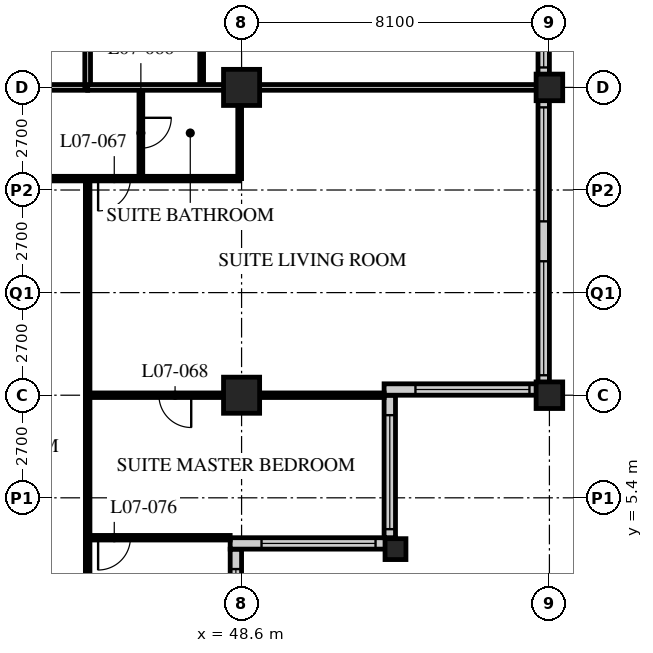
"""IFC4 building model, lengths in metres.
Left out: names, types, materials, properties, quantities, classifications, styles, units other than length and angle.
Written with IfcOpenShell. Run it as: python <this file> out.ifc"""

import sys

from ifc_helpers import new_model, si_unit, direction, frame, frame_2d, origin, origin_2d, place, context, subcontext, project, spatial, rectangle, hollow_rectangle, extrude, element, fill, save


model = new_model("IFC4")
c1 = context("Model", 3, precision=1e-05, world=origin(), true_north=direction((0.0, 1.0)))
c2 = subcontext(c1, "Body", "Model", "MODEL_VIEW")
j1 = project(units=[si_unit("LENGTHUNIT", "METRE"), si_unit("PLANEANGLEUNIT", "RADIAN")], contexts=[c1])
p1 = place(None, origin())
s1 = spatial("IfcSite", under=j1, at=p1, CompositionType="ELEMENT")
p2 = place(p1, origin())
s2 = spatial("IfcBuilding", under=s1, at=p2, CompositionType="ELEMENT")
p3 = place(p2, frame((0.0, 0.0, 36.4)))
s3 = spatial("IfcBuildingStorey", under=s2, at=p3, CompositionType="ELEMENT", Elevation=36.4)
for number, where, z_axis, x_axis in (
    (1, (48.6, 8.1, 0.0), (0.0, 0.0, 1.0), (1.0, 0.0, 0.0)),
    (2, (48.6, 16.2, 0.0), (0.0, 0.0, 1.0), (1.0, 0.0, 0.0)),
):
    element("IfcColumn", number, at=place(p3, frame(where, z_axis=z_axis, x_axis=x_axis)), inside=s3, PredefinedType="COLUMN", context=c2, shape_type="SweptSolid", body=[
        extrude(hollow_rectangle(XDim=0.95, YDim=0.95, WallThickness=0.095, at=origin_2d()), origin(), (0.0, 0.0, 1.0), 3.4),
    ])
p4 = place(p3, frame((52.65, 4.05, 0.0), z_axis=(0.0, 0.0, 1.0), x_axis=(1.0, 0.0, 0.0)))
e3 = element("IfcColumn", 3, at=p4, inside=s3, PredefinedType="COLUMN", context=c2, shape_type="SweptSolid", body=[
    extrude(hollow_rectangle(XDim=0.55, YDim=0.55, WallThickness=0.05, at=origin_2d()), origin(), (0.0, 0.0, 1.0), 3.4),
])
for number, where, z_axis, x_axis in (
    (4, (56.7, 8.1, 0.0), (0.0, 0.0, 1.0), (1.0, 0.0, 0.0)),
    (5, (56.7, 16.2, 0.0), (0.0, 0.0, 1.0), (1.0, 0.0, 0.0)),
):
    element("IfcColumn", number, at=place(p3, frame(where, z_axis=z_axis, x_axis=x_axis)), inside=s3, PredefinedType="COLUMN", context=c2, shape_type="SweptSolid", body=[
        extrude(hollow_rectangle(XDim=0.7, YDim=0.7, WallThickness=0.06, at=origin_2d()), origin(), (0.0, 0.0, 1.0), 3.4),
    ])
p5 = place(p3, frame((48.45, 0.3, 0.0), z_axis=(0.0, 0.0, 1.0), x_axis=(0.0, 1.0, 0.0)))
e6 = element("IfcWall", 6, at=p5, inside=s3, PredefinedType="SOLIDWALL", context=c2, shape_type="SweptSolid", body=[
    extrude(rectangle(XDim=3.75, YDim=0.3, at=frame_2d((1.875, 0.0))), origin(), (0.0, 0.0, 1.0), 3.19),
])
p6 = place(p5, frame((0.225, 0.0, 0.9)))
e7 = element("IfcOpeningElement", 7, at=p6, cuts=e6, PredefinedType="OPENING", context=c2, shape_type="SweptSolid", body=[
    extrude(rectangle(XDim=3.0, YDim=1.5, at=frame_2d((1.5, 0.75))), frame((0.0, 0.16, 0.0), z_axis=(0.0, -1.0, 0.0), x_axis=(1.0, 0.0, 0.0)), (0.0, 0.0, 1.0), 0.32),
])
p7 = place(p3, frame((48.3, 4.2, 0.0), z_axis=(0.0, 0.0, 1.0), x_axis=(1.0, 0.0, 0.0)))
e8 = element("IfcWall", 8, at=p7, inside=s3, PredefinedType="SOLIDWALL", context=c2, shape_type="SweptSolid", body=[
    extrude(rectangle(XDim=4.35, YDim=0.3, at=frame_2d((2.175, 0.0))), origin(), (0.0, 0.0, 1.0), 3.19),
])
p8 = place(p7, frame((0.825, 0.0, 0.9)))
e9 = element("IfcOpeningElement", 9, at=p8, cuts=e8, PredefinedType="OPENING", context=c2, shape_type="SweptSolid", body=[
    extrude(rectangle(XDim=3.0, YDim=1.5, at=frame_2d((1.5, 0.75))), frame((0.0, 0.16, 0.0), z_axis=(0.0, -1.0, 0.0), x_axis=(1.0, 0.0, 0.0)), (0.0, 0.0, 1.0), 0.32),
])
p9 = place(p3, frame((52.5, 4.35, 0.0), z_axis=(0.0, 0.0, 1.0), x_axis=(0.0, 1.0, 0.0)))
e10 = element("IfcWall", 10, at=p9, inside=s3, PredefinedType="SOLIDWALL", context=c2, shape_type="SweptSolid", body=[
    extrude(rectangle(XDim=3.75, YDim=0.3, at=frame_2d((1.875, 0.0))), origin(), (0.0, 0.0, 1.0), 3.19),
])
p10 = place(p9, frame((0.225, 0.0, 0.9)))
e11 = element("IfcOpeningElement", 11, at=p10, cuts=e10, PredefinedType="OPENING", context=c2, shape_type="SweptSolid", body=[
    extrude(rectangle(XDim=3.0, YDim=1.5, at=frame_2d((1.5, 0.75))), frame((0.0, 0.16, 0.0), z_axis=(0.0, -1.0, 0.0), x_axis=(1.0, 0.0, 0.0)), (0.0, 0.0, 1.0), 0.32),
])
p11 = place(p3, frame((52.35, 8.25, 0.0), z_axis=(0.0, 0.0, 1.0), x_axis=(1.0, 0.0, 0.0)))
e12 = element("IfcWall", 12, at=p11, inside=s3, PredefinedType="SOLIDWALL", context=c2, shape_type="SweptSolid", body=[
    extrude(rectangle(XDim=4.35, YDim=0.3, at=frame_2d((2.175, 0.0))), origin(), (0.0, 0.0, 1.0), 3.19),
])
p12 = place(p11, frame((0.825, 0.0, 0.9)))
e13 = element("IfcOpeningElement", 13, at=p12, cuts=e12, PredefinedType="OPENING", context=c2, shape_type="SweptSolid", body=[
    extrude(rectangle(XDim=3.0, YDim=1.5, at=frame_2d((1.5, 0.75))), frame((0.0, 0.16, 0.0), z_axis=(0.0, -1.0, 0.0), x_axis=(1.0, 0.0, 0.0)), (0.0, 0.0, 1.0), 0.32),
])
p13 = place(p3, frame((56.55, 8.4, 0.0), z_axis=(0.0, 0.0, 1.0), x_axis=(0.0, 1.0, 0.0)))
e14 = element("IfcWall", 14, at=p13, inside=s3, PredefinedType="SOLIDWALL", context=c2, shape_type="SweptSolid", body=[
    extrude(rectangle(XDim=32.1, YDim=0.3, at=frame_2d((16.05, 0.0))), origin(), (0.0, 0.0, 1.0), 3.19),
])
p14 = place(p13, frame((0.225, 0.0, 0.9)))
e15 = element("IfcOpeningElement", 15, at=p14, cuts=e14, PredefinedType="OPENING", context=c2, shape_type="SweptSolid", body=[
    extrude(rectangle(XDim=3.0, YDim=2.0, at=frame_2d((1.5, 1.0))), frame((0.0, 0.16, 0.0), z_axis=(0.0, -1.0, 0.0), x_axis=(1.0, 0.0, 0.0)), (0.0, 0.0, 1.0), 0.32),
])
p15 = place(p13, frame((4.275, 0.0, 0.9)))
e16 = element("IfcOpeningElement", 16, at=p15, cuts=e14, PredefinedType="OPENING", context=c2, shape_type="SweptSolid", body=[
    extrude(rectangle(XDim=3.0, YDim=2.0, at=frame_2d((1.5, 1.0))), frame((0.0, 0.16, 0.0), z_axis=(0.0, -1.0, 0.0), x_axis=(1.0, 0.0, 0.0)), (0.0, 0.0, 1.0), 0.32),
])
p16 = place(p13, frame((8.325, 0.0, 0.9)))
e17 = element("IfcOpeningElement", 17, at=p16, cuts=e14, PredefinedType="OPENING", context=c2, shape_type="SweptSolid", body=[
    extrude(rectangle(XDim=3.0, YDim=2.0, at=frame_2d((1.5, 1.0))), frame((0.0, 0.16, 0.0), z_axis=(0.0, -1.0, 0.0), x_axis=(1.0, 0.0, 0.0)), (0.0, 0.0, 1.0), 0.32),
])
p17 = place(p13, frame((12.375, 0.0, 0.9)))
e18 = element("IfcOpeningElement", 18, at=p17, cuts=e14, PredefinedType="OPENING", context=c2, shape_type="SweptSolid", body=[
    extrude(rectangle(XDim=3.0, YDim=2.0, at=frame_2d((1.5, 1.0))), frame((0.0, 0.16, 0.0), z_axis=(0.0, -1.0, 0.0), x_axis=(1.0, 0.0, 0.0)), (0.0, 0.0, 1.0), 0.32),
])
p18 = place(p13, frame((16.425, 0.0, 0.9)))
e19 = element("IfcOpeningElement", 19, at=p18, cuts=e14, PredefinedType="OPENING", context=c2, shape_type="SweptSolid", body=[
    extrude(rectangle(XDim=3.0, YDim=2.0, at=frame_2d((1.5, 1.0))), frame((0.0, 0.16, 0.0), z_axis=(0.0, -1.0, 0.0), x_axis=(1.0, 0.0, 0.0)), (0.0, 0.0, 1.0), 0.32),
])
p19 = place(p13, frame((20.475, 0.0, 0.9)))
e20 = element("IfcOpeningElement", 20, at=p19, cuts=e14, PredefinedType="OPENING", context=c2, shape_type="SweptSolid", body=[
    extrude(rectangle(XDim=3.0, YDim=2.0, at=frame_2d((1.5, 1.0))), frame((0.0, 0.16, 0.0), z_axis=(0.0, -1.0, 0.0), x_axis=(1.0, 0.0, 0.0)), (0.0, 0.0, 1.0), 0.32),
])
p20 = place(p13, frame((24.525, 0.0, 0.9)))
e21 = element("IfcOpeningElement", 21, at=p20, cuts=e14, PredefinedType="OPENING", context=c2, shape_type="SweptSolid", body=[
    extrude(rectangle(XDim=3.0, YDim=2.0, at=frame_2d((1.5, 1.0))), frame((0.0, 0.16, 0.0), z_axis=(0.0, -1.0, 0.0), x_axis=(1.0, 0.0, 0.0)), (0.0, 0.0, 1.0), 0.32),
])
p21 = place(p13, frame((28.575, 0.0, 0.9)))
e22 = element("IfcOpeningElement", 22, at=p21, cuts=e14, PredefinedType="OPENING", context=c2, shape_type="SweptSolid", body=[
    extrude(rectangle(XDim=3.0, YDim=2.0, at=frame_2d((1.5, 1.0))), frame((0.0, 0.16, 0.0), z_axis=(0.0, -1.0, 0.0), x_axis=(1.0, 0.0, 0.0)), (0.0, 0.0, 1.0), 0.32),
])
p22 = place(p3, frame((12.15, 16.2, 0.0), z_axis=(0.0, 0.0, 1.0), x_axis=(1.0, 0.0, 0.0)))
e23 = element("IfcWall", 23, at=p22, inside=s3, PredefinedType="PARTITIONING", context=c2, shape_type="SweptSolid", body=[
    extrude(rectangle(XDim=32.4, YDim=0.15, at=frame_2d((16.2, 0.0))), origin(), (0.0, 0.0, 1.0), 2.578),
])
p23 = place(p22, frame((6.5, 0.0, 0.0)))
e24 = element("IfcOpeningElement", 24, at=p23, cuts=e23, PredefinedType="OPENING", context=c2, shape_type="SweptSolid", body=[
    extrude(rectangle(XDim=1.0, YDim=2.1, at=frame_2d((0.5, 1.05))), frame((0.0, 0.085, 0.0), z_axis=(0.0, -1.0, 0.0), x_axis=(1.0, 0.0, 0.0)), (0.0, 0.0, 1.0), 0.17),
])
p24 = place(p22, frame((8.4, 0.0, 0.0)))
e25 = element("IfcOpeningElement", 25, at=p24, cuts=e23, PredefinedType="OPENING", context=c2, shape_type="SweptSolid", body=[
    extrude(rectangle(XDim=1.0, YDim=2.1, at=frame_2d((0.5, 1.05))), frame((0.0, 0.085, 0.0), z_axis=(0.0, -1.0, 0.0), x_axis=(1.0, 0.0, 0.0)), (0.0, 0.0, 1.0), 0.17),
])
p25 = place(p22, frame((14.6, 0.0, 0.0)))
e26 = element("IfcOpeningElement", 26, at=p25, cuts=e23, PredefinedType="OPENING", context=c2, shape_type="SweptSolid", body=[
    extrude(rectangle(XDim=1.0, YDim=2.1, at=frame_2d((0.5, 1.05))), frame((0.0, 0.085, 0.0), z_axis=(0.0, -1.0, 0.0), x_axis=(1.0, 0.0, 0.0)), (0.0, 0.0, 1.0), 0.17),
])
p26 = place(p22, frame((16.5, 0.0, 0.0)))
e27 = element("IfcOpeningElement", 27, at=p26, cuts=e23, PredefinedType="OPENING", context=c2, shape_type="SweptSolid", body=[
    extrude(rectangle(XDim=1.0, YDim=2.1, at=frame_2d((0.5, 1.05))), frame((0.0, 0.085, 0.0), z_axis=(0.0, -1.0, 0.0), x_axis=(1.0, 0.0, 0.0)), (0.0, 0.0, 1.0), 0.17),
])
p27 = place(p22, frame((23.0, 0.0, 0.0)))
e28 = element("IfcOpeningElement", 28, at=p27, cuts=e23, PredefinedType="OPENING", context=c2, shape_type="SweptSolid", body=[
    extrude(rectangle(XDim=1.0, YDim=2.1, at=frame_2d((0.5, 1.05))), frame((0.0, 0.085, 0.0), z_axis=(0.0, -1.0, 0.0), x_axis=(1.0, 0.0, 0.0)), (0.0, 0.0, 1.0), 0.17),
])
p28 = place(p22, frame((24.6, 0.0, 0.0)))
e29 = element("IfcOpeningElement", 29, at=p28, cuts=e23, PredefinedType="OPENING", context=c2, shape_type="SweptSolid", body=[
    extrude(rectangle(XDim=1.0, YDim=2.1, at=frame_2d((0.5, 1.05))), frame((0.0, 0.085, 0.0), z_axis=(0.0, -1.0, 0.0), x_axis=(1.0, 0.0, 0.0)), (0.0, 0.0, 1.0), 0.17),
])
p29 = place(p22, frame((1.525, 0.0, 0.0)))
e30 = element("IfcOpeningElement", 30, at=p29, cuts=e23, PredefinedType="OPENING", context=c2, shape_type="SweptSolid", body=[
    extrude(rectangle(XDim=1.0, YDim=2.1, at=frame_2d((0.5, 1.05))), frame((0.0, 0.085, 0.0), z_axis=(0.0, -1.0, 0.0), x_axis=(1.0, 0.0, 0.0)), (0.0, 0.0, 1.0), 0.17),
])
p30 = place(p22, frame((29.875, 0.0, 0.0)))
e31 = element("IfcOpeningElement", 31, at=p30, cuts=e23, PredefinedType="OPENING", context=c2, shape_type="SweptSolid", body=[
    extrude(rectangle(XDim=1.0, YDim=2.1, at=frame_2d((0.5, 1.05))), frame((0.0, 0.085, 0.0), z_axis=(0.0, -1.0, 0.0), x_axis=(1.0, 0.0, 0.0)), (0.0, 0.0, 1.0), 0.17),
])
p31 = place(p3, frame((44.55, 16.2, 0.0), z_axis=(0.0, 0.0, 1.0), x_axis=(0.0, 1.0, 0.0)))
e32 = element("IfcWall", 32, at=p31, inside=s3, PredefinedType="PARTITIONING", context=c2, shape_type="SweptSolid", body=[
    extrude(rectangle(XDim=26.1, YDim=0.15, at=frame_2d((13.05, 0.0))), origin(), (0.0, 0.0, 1.0), 3.19),
])
p32 = place(p31, frame((2.75, 0.0, 0.0)))
e33 = element("IfcOpeningElement", 33, at=p32, cuts=e32, PredefinedType="OPENING", context=c2, shape_type="SweptSolid", body=[
    extrude(rectangle(XDim=1.0, YDim=2.1, at=frame_2d((0.5, 1.05))), frame((0.0, 0.085, 0.0), z_axis=(0.0, -1.0, 0.0), x_axis=(1.0, 0.0, 0.0)), (0.0, 0.0, 1.0), 0.17),
])
p33 = place(p31, frame((4.35, 0.0, 0.0)))
e34 = element("IfcOpeningElement", 34, at=p33, cuts=e32, PredefinedType="OPENING", context=c2, shape_type="SweptSolid", body=[
    extrude(rectangle(XDim=1.0, YDim=2.1, at=frame_2d((0.5, 1.05))), frame((0.0, 0.085, 0.0), z_axis=(0.0, -1.0, 0.0), x_axis=(1.0, 0.0, 0.0)), (0.0, 0.0, 1.0), 0.17),
])
p34 = place(p31, frame((8.4, 0.0, 0.0)))
e35 = element("IfcOpeningElement", 35, at=p34, cuts=e32, PredefinedType="OPENING", context=c2, shape_type="SweptSolid", body=[
    extrude(rectangle(XDim=1.0, YDim=2.1, at=frame_2d((0.5, 1.05))), frame((0.0, 0.085, 0.0), z_axis=(0.0, -1.0, 0.0), x_axis=(1.0, 0.0, 0.0)), (0.0, 0.0, 1.0), 0.17),
])
p35 = place(p31, frame((14.6, 0.0, 0.0)))
e36 = element("IfcOpeningElement", 36, at=p35, cuts=e32, PredefinedType="OPENING", context=c2, shape_type="SweptSolid", body=[
    extrude(rectangle(XDim=1.0, YDim=2.1, at=frame_2d((0.5, 1.05))), frame((0.0, 0.085, 0.0), z_axis=(0.0, -1.0, 0.0), x_axis=(1.0, 0.0, 0.0)), (0.0, 0.0, 1.0), 0.17),
])
p36 = place(p31, frame((18.65, 0.0, 0.0)))
e37 = element("IfcOpeningElement", 37, at=p36, cuts=e32, PredefinedType="OPENING", context=c2, shape_type="SweptSolid", body=[
    extrude(rectangle(XDim=1.0, YDim=2.1, at=frame_2d((0.5, 1.05))), frame((0.0, 0.085, 0.0), z_axis=(0.0, -1.0, 0.0), x_axis=(1.0, 0.0, 0.0)), (0.0, 0.0, 1.0), 0.17),
])
p37 = place(p31, frame((22.65, 0.0, 0.0)))
e38 = element("IfcOpeningElement", 38, at=p37, cuts=e32, PredefinedType="OPENING", context=c2, shape_type="SweptSolid", body=[
    extrude(rectangle(XDim=1.0, YDim=2.1, at=frame_2d((0.5, 1.05))), frame((0.0, 0.085, 0.0), z_axis=(0.0, -1.0, 0.0), x_axis=(1.0, 0.0, 0.0)), (0.0, 0.0, 1.0), 0.17),
])
p38 = place(p3, frame((47.55, 16.2, 0.0), z_axis=(0.0, 0.0, 1.0), x_axis=(0.0, 1.0, 0.0)))
e39 = element("IfcWall", 39, at=p38, inside=s3, PredefinedType="PARTITIONING", context=c2, shape_type="SweptSolid", body=[
    extrude(rectangle(XDim=2.6, YDim=0.1, at=frame_2d((1.3, 0.0))), origin(), (0.0, 0.0, 1.0), 3.19),
])
p39 = place(p3, frame((40.5, 13.8, 0.0), z_axis=(0.0, 0.0, 1.0), x_axis=(1.0, 0.0, 0.0)))
e40 = element("IfcWall", 40, at=p39, inside=s3, PredefinedType="PARTITIONING", context=c2, shape_type="SweptSolid", body=[
    extrude(rectangle(XDim=8.05, YDim=0.12, at=frame_2d((4.025, 0.0))), origin(), (0.0, 0.0, 1.0), 3.19),
])
p40 = place(p39, frame((0.475, 0.0, 0.0)))
e41 = element("IfcOpeningElement", 41, at=p40, cuts=e40, PredefinedType="OPENING", context=c2, shape_type="SweptSolid", body=[
    extrude(rectangle(XDim=0.85, YDim=2.1, at=frame_2d((0.425, 1.05))), frame((0.0, 0.07, 0.0), z_axis=(0.0, -1.0, 0.0), x_axis=(1.0, 0.0, 0.0)), (0.0, 0.0, 1.0), 0.14),
])
p41 = place(p39, frame((4.325, 0.0, 0.0)))
e42 = element("IfcOpeningElement", 42, at=p41, cuts=e40, PredefinedType="OPENING", context=c2, shape_type="SweptSolid", body=[
    extrude(rectangle(XDim=0.85, YDim=2.1, at=frame_2d((0.425, 1.05))), frame((0.0, 0.07, 0.0), z_axis=(0.0, -1.0, 0.0), x_axis=(1.0, 0.0, 0.0)), (0.0, 0.0, 1.0), 0.14),
])
p42 = place(p3, frame((45.95, 16.2, 0.0), z_axis=(0.0, 0.0, 1.0), x_axis=(0.0, -1.0, 0.0)))
e43 = element("IfcWall", 43, at=p42, inside=s3, PredefinedType="PARTITIONING", context=c2, shape_type="SweptSolid", body=[
    extrude(rectangle(XDim=2.4, YDim=0.1, at=frame_2d((1.2, 0.0))), origin(), (0.0, 0.0, 1.0), 3.19),
])
p43 = place(p42, frame((0.8, 0.0, 0.0)))
e44 = element("IfcOpeningElement", 44, at=p43, cuts=e43, PredefinedType="OPENING", context=c2, shape_type="SweptSolid", body=[
    extrude(rectangle(XDim=0.8, YDim=2.1, at=frame_2d((0.4, 1.05))), frame((0.0, 0.06, 0.0), z_axis=(0.0, -1.0, 0.0), x_axis=(1.0, 0.0, 0.0)), (0.0, 0.0, 1.0), 0.12),
])
p44 = place(p3, frame((48.55, 16.2, 0.0), z_axis=(0.0, 0.0, 1.0), x_axis=(0.0, -1.0, 0.0)))
e45 = element("IfcWall", 45, at=p44, inside=s3, PredefinedType="PARTITIONING", context=c2, shape_type="SweptSolid", body=[
    extrude(rectangle(XDim=2.4, YDim=0.1, at=frame_2d((1.2, 0.0))), origin(), (0.0, 0.0, 1.0), 2.578),
])
p45 = place(p3, frame((44.55, 13.8, 0.0), z_axis=(0.0, 0.0, 1.0), x_axis=(0.0, -1.0, 0.0)))
e46 = element("IfcWall", 46, at=p45, inside=s3, PredefinedType="PARTITIONING", context=c2, shape_type="SweptSolid", body=[
    extrude(rectangle(XDim=13.5, YDim=0.12, at=frame_2d((6.75, 0.0))), origin(), (0.0, 0.0, 1.0), 3.19),
])
p46 = place(p3, frame((44.55, 8.1, 0.0), z_axis=(0.0, 0.0, 1.0), x_axis=(1.0, 0.0, 0.0)))
e47 = element("IfcWall", 47, at=p46, inside=s3, PredefinedType="PARTITIONING", context=c2, shape_type="SweptSolid", body=[
    extrude(rectangle(XDim=7.8, YDim=0.12, at=frame_2d((3.9, 0.0))), origin(), (0.0, 0.0, 1.0), 2.578),
])
p47 = place(p46, frame((1.875, 0.0, 0.0)))
e48 = element("IfcOpeningElement", 48, at=p47, cuts=e47, PredefinedType="OPENING", context=c2, shape_type="SweptSolid", body=[
    extrude(rectangle(XDim=0.85, YDim=2.1, at=frame_2d((0.425, 1.05))), frame((0.0, 0.07, 0.0), z_axis=(0.0, -1.0, 0.0), x_axis=(1.0, 0.0, 0.0)), (0.0, 0.0, 1.0), 0.14),
])
p48 = place(p3, frame((44.55, 16.2, 0.0), z_axis=(0.0, 0.0, 1.0), x_axis=(1.0, 0.0, 0.0)))
e49 = element("IfcWall", 49, at=p48, inside=s3, PredefinedType="PARTITIONING", context=c2, shape_type="SweptSolid", body=[
    extrude(rectangle(XDim=11.85, YDim=0.15, at=frame_2d((5.925, 0.0))), origin(), (0.0, 0.0, 1.0), 2.578),
])
p49 = place(p3, frame((44.55, 4.35, 0.0), z_axis=(0.0, 0.0, 1.0), x_axis=(1.0, 0.0, 0.0)))
e50 = element("IfcWall", 50, at=p49, inside=s3, PredefinedType="PARTITIONING", context=c2, shape_type="SweptSolid", body=[
    extrude(rectangle(XDim=3.75, YDim=0.12, at=frame_2d((1.875, 0.0))), origin(), (0.0, 0.0, 1.0), 3.19),
])
p50 = place(p49, frame((0.275, 0.0, 0.0)))
e51 = element("IfcOpeningElement", 51, at=p50, cuts=e50, PredefinedType="OPENING", context=c2, shape_type="SweptSolid", body=[
    extrude(rectangle(XDim=0.85, YDim=2.1, at=frame_2d((0.425, 1.05))), frame((0.0, 0.07, 0.0), z_axis=(0.0, -1.0, 0.0), x_axis=(1.0, 0.0, 0.0)), (0.0, 0.0, 1.0), 0.14),
])
p51 = place(p6, origin())
e52 = element("IfcWindow", 52, at=p51, inside=s3, PartitioningType="SINGLE_PANEL", PredefinedType="WINDOW", context=c2, shape_type="SweptSolid", body=[
    extrude(rectangle(XDim=3.0, YDim=1.5, at=frame_2d((1.5, 0.75))), frame((0.0, 0.03, 0.0), z_axis=(0.0, -1.0, 0.0), x_axis=(1.0, 0.0, 0.0)), (0.0, 0.0, 1.0), 0.06),
])
fill(e7, e52)
p52 = place(p8, origin())
e53 = element("IfcWindow", 53, at=p52, inside=s3, PartitioningType="SINGLE_PANEL", PredefinedType="WINDOW", context=c2, shape_type="SweptSolid", body=[
    extrude(rectangle(XDim=3.0, YDim=1.5, at=frame_2d((1.5, 0.75))), frame((0.0, 0.03, 0.0), z_axis=(0.0, -1.0, 0.0), x_axis=(1.0, 0.0, 0.0)), (0.0, 0.0, 1.0), 0.06),
])
fill(e9, e53)
p53 = place(p10, origin())
e54 = element("IfcWindow", 54, at=p53, inside=s3, PartitioningType="SINGLE_PANEL", PredefinedType="WINDOW", context=c2, shape_type="SweptSolid", body=[
    extrude(rectangle(XDim=3.0, YDim=1.5, at=frame_2d((1.5, 0.75))), frame((0.0, 0.03, 0.0), z_axis=(0.0, -1.0, 0.0), x_axis=(1.0, 0.0, 0.0)), (0.0, 0.0, 1.0), 0.06),
])
fill(e11, e54)
p54 = place(p12, origin())
e55 = element("IfcWindow", 55, at=p54, inside=s3, PartitioningType="SINGLE_PANEL", PredefinedType="WINDOW", context=c2, shape_type="SweptSolid", body=[
    extrude(rectangle(XDim=3.0, YDim=1.5, at=frame_2d((1.5, 0.75))), frame((0.0, 0.03, 0.0), z_axis=(0.0, -1.0, 0.0), x_axis=(1.0, 0.0, 0.0)), (0.0, 0.0, 1.0), 0.06),
])
fill(e13, e55)
p55 = place(p14, origin())
e56 = element("IfcWindow", 56, at=p55, inside=s3, PartitioningType="SINGLE_PANEL", PredefinedType="WINDOW", context=c2, shape_type="SweptSolid", body=[
    extrude(rectangle(XDim=3.0, YDim=2.0, at=frame_2d((1.5, 1.0))), frame((0.0, 0.03, 0.0), z_axis=(0.0, -1.0, 0.0), x_axis=(1.0, 0.0, 0.0)), (0.0, 0.0, 1.0), 0.06),
])
fill(e15, e56)
p56 = place(p15, origin())
e57 = element("IfcWindow", 57, at=p56, inside=s3, PartitioningType="SINGLE_PANEL", PredefinedType="WINDOW", context=c2, shape_type="SweptSolid", body=[
    extrude(rectangle(XDim=3.0, YDim=2.0, at=frame_2d((1.5, 1.0))), frame((0.0, 0.03, 0.0), z_axis=(0.0, -1.0, 0.0), x_axis=(1.0, 0.0, 0.0)), (0.0, 0.0, 1.0), 0.06),
])
fill(e16, e57)
p57 = place(p16, origin())
e58 = element("IfcWindow", 58, at=p57, inside=s3, PartitioningType="SINGLE_PANEL", PredefinedType="WINDOW", context=c2, shape_type="SweptSolid", body=[
    extrude(rectangle(XDim=3.0, YDim=2.0, at=frame_2d((1.5, 1.0))), frame((0.0, 0.03, 0.0), z_axis=(0.0, -1.0, 0.0), x_axis=(1.0, 0.0, 0.0)), (0.0, 0.0, 1.0), 0.06),
])
fill(e17, e58)
p58 = place(p43, origin())
e59 = element("IfcDoor", 59, at=p58, inside=s3, OperationType="SINGLE_SWING_LEFT", PredefinedType="DOOR", context=c2, shape_type="SweptSolid", body=[
    extrude(rectangle(XDim=0.8, YDim=2.1, at=frame_2d((0.4, 1.05))), frame((0.0, 0.025, 0.0), z_axis=(0.0, -1.0, 0.0), x_axis=(1.0, 0.0, 0.0)), (0.0, 0.0, 1.0), 0.05),
])
fill(e44, e59)
p59 = place(p41, origin())
e60 = element("IfcDoor", 60, at=p59, inside=s3, OperationType="SINGLE_SWING_RIGHT", PredefinedType="DOOR", context=c2, shape_type="SweptSolid", body=[
    extrude(rectangle(XDim=0.85, YDim=2.1, at=frame_2d((0.425, 1.05))), frame((0.0, 0.025, 0.0), z_axis=(0.0, -1.0, 0.0), x_axis=(1.0, 0.0, 0.0)), (0.0, 0.0, 1.0), 0.05),
])
fill(e42, e60)
p60 = place(p47, origin())
e61 = element("IfcDoor", 61, at=p60, inside=s3, OperationType="SINGLE_SWING_LEFT", PredefinedType="DOOR", context=c2, shape_type="SweptSolid", body=[
    extrude(rectangle(XDim=0.85, YDim=2.1, at=frame_2d((0.425, 1.05))), frame((0.0, 0.025, 0.0), z_axis=(0.0, -1.0, 0.0), x_axis=(1.0, 0.0, 0.0)), (0.0, 0.0, 1.0), 0.05),
])
fill(e48, e61)
p61 = place(p50, origin())
e62 = element("IfcDoor", 62, at=p61, inside=s3, OperationType="SINGLE_SWING_RIGHT", PredefinedType="DOOR", context=c2, shape_type="SweptSolid", body=[
    extrude(rectangle(XDim=0.85, YDim=2.1, at=frame_2d((0.425, 1.05))), frame((0.0, 0.025, 0.0), z_axis=(0.0, -1.0, 0.0), x_axis=(1.0, 0.0, 0.0)), (0.0, 0.0, 1.0), 0.05),
])
fill(e51, e62)
save(model, sys.argv[1])
